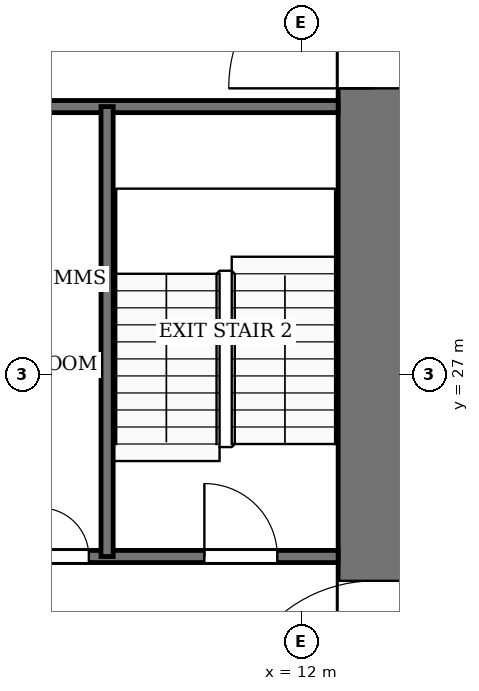
"""IFC4 building model, lengths in metres.
Left out: names, types, materials, properties, quantities, classifications, styles, units other than length and angle.
Written with IfcOpenShell. Run it as: python <this file> out.ifc"""

import sys

from ifc_helpers import new_model, si_unit, direction, frame, frame_2d, origin, place, context, subcontext, project, spatial, rectangle, extrude, element, fill, save


model = new_model("IFC4")
c1 = context("Model", 3, precision=1e-05, world=origin(), true_north=direction((0.0, 1.0)))
c2 = subcontext(c1, "Body", "Model", "MODEL_VIEW")
j1 = project(units=[si_unit("LENGTHUNIT", "METRE"), si_unit("PLANEANGLEUNIT", "RADIAN")], contexts=[c1])
p1 = place(None, origin())
s1 = spatial("IfcSite", under=j1, at=p1, CompositionType="ELEMENT")
p2 = place(p1, origin())
s2 = spatial("IfcBuilding", under=s1, at=p2, CompositionType="ELEMENT")
p3 = place(p2, frame((0.0, 0.0, 70.0)))
s3 = spatial("IfcBuildingStorey", under=s2, at=p3, CompositionType="ELEMENT", Elevation=70.0)
p4 = place(p3, frame((13.2, 18.4, -0.13), z_axis=(0.0, 0.0, 1.0), x_axis=(0.0, 1.0, 0.0)))
e1 = element("IfcWall", 1, at=p4, inside=s3, PredefinedType="SHEAR", context=c2, shape_type="SweptSolid", body=[
    extrude(rectangle(XDim=19.2, YDim=1.2, at=frame_2d((9.6, 0.0))), origin(), (0.0, 0.0, 1.0), 4.0),
])
p5 = place(p4, frame((2.8, 0.0, 0.13)))
e2 = element("IfcOpeningElement", 2, at=p5, cuts=e1, PredefinedType="OPENING", context=c2, shape_type="SweptSolid", body=[
    extrude(rectangle(XDim=2.4, YDim=2.4, at=frame_2d((1.2, 1.2))), frame((0.0, 0.61, 0.0), z_axis=(0.0, -1.0, 0.0), x_axis=(1.0, 0.0, 0.0)), (0.0, 0.0, 1.0), 1.22),
])
p6 = place(p4, frame((13.3, 0.0, 0.13)))
e3 = element("IfcOpeningElement", 3, at=p6, cuts=e1, PredefinedType="OPENING", context=c2, shape_type="SweptSolid", body=[
    extrude(rectangle(XDim=2.4, YDim=2.4, at=frame_2d((1.2, 1.2))), frame((0.0, 0.61, 0.0), z_axis=(0.0, -1.0, 0.0), x_axis=(1.0, 0.0, 0.0)), (0.0, 0.0, 1.0), 1.22),
])
p7 = place(p3, frame((6.0, 24.0, 0.0), z_axis=(0.0, 0.0, 1.0), x_axis=(1.0, 0.0, 0.0)))
e4 = element("IfcWall", 4, at=p7, inside=s3, PredefinedType="PARTITIONING", context=c2, shape_type="SweptSolid", body=[
    extrude(rectangle(XDim=6.6, YDim=0.2, at=frame_2d((3.3, 0.0))), origin(), (0.0, 0.0, 1.0), 3.87),
])
p8 = place(p7, frame((0.3, 0.0, 0.0)))
e5 = element("IfcOpeningElement", 5, at=p8, cuts=e4, PredefinedType="OPENING", context=c2, shape_type="SweptSolid", body=[
    extrude(rectangle(XDim=0.8, YDim=2.1, at=frame_2d((0.4, 1.05))), frame((0.0, 0.11, 0.0), z_axis=(0.0, -1.0, 0.0), x_axis=(1.0, 0.0, 0.0)), (0.0, 0.0, 1.0), 0.22),
])
p9 = place(p7, frame((1.7, 0.0, 0.0)))
e6 = element("IfcOpeningElement", 6, at=p9, cuts=e4, PredefinedType="OPENING", context=c2, shape_type="SweptSolid", body=[
    extrude(rectangle(XDim=0.8, YDim=2.1, at=frame_2d((0.4, 1.05))), frame((0.0, 0.11, 0.0), z_axis=(0.0, -1.0, 0.0), x_axis=(1.0, 0.0, 0.0)), (0.0, 0.0, 1.0), 0.22),
])
p10 = place(p7, frame((4.4, 0.0, 0.0)))
e7 = element("IfcOpeningElement", 7, at=p10, cuts=e4, PredefinedType="OPENING", context=c2, shape_type="SweptSolid", body=[
    extrude(rectangle(XDim=1.2, YDim=2.2, at=frame_2d((0.6, 1.1))), frame((0.0, 0.11, 0.0), z_axis=(0.0, -1.0, 0.0), x_axis=(1.0, 0.0, 0.0)), (0.0, 0.0, 1.0), 0.22),
])
p11 = place(p3, frame((6.0, 31.4, 0.0), z_axis=(0.0, 0.0, 1.0), x_axis=(1.0, 0.0, 0.0)))
e8 = element("IfcWall", 8, at=p11, inside=s3, PredefinedType="PARTITIONING", context=c2, shape_type="SweptSolid", body=[
    extrude(rectangle(XDim=6.6, YDim=0.2, at=frame_2d((3.3, 0.0))), origin(), (0.0, 0.0, 1.0), 3.87),
])
p12 = place(p3, frame((8.8, 24.0, 0.0), z_axis=(0.0, 0.0, 1.0), x_axis=(0.0, 1.0, 0.0)))
e9 = element("IfcWall", 9, at=p12, inside=s3, PredefinedType="PARTITIONING", context=c2, shape_type="SweptSolid", body=[
    extrude(rectangle(XDim=7.4, YDim=0.2, at=frame_2d((3.7, 0.0))), origin(), (0.0, 0.0, 1.0), 3.87),
])
p13 = place(p9, origin())
e10 = element("IfcDoor", 10, at=p13, inside=s3, OperationType="SINGLE_SWING_LEFT", PredefinedType="DOOR", context=c2, shape_type="SweptSolid", body=[
    extrude(rectangle(XDim=0.8, YDim=2.1, at=frame_2d((0.4, 1.05))), frame((0.0, 0.025, 0.0), z_axis=(0.0, -1.0, 0.0), x_axis=(1.0, 0.0, 0.0)), (0.0, 0.0, 1.0), 0.05),
])
fill(e6, e10)
p14 = place(p10, origin())
e11 = element("IfcDoor", 11, at=p14, inside=s3, OperationType="SINGLE_SWING_RIGHT", PredefinedType="DOOR", context=c2, shape_type="SweptSolid", body=[
    extrude(rectangle(XDim=1.2, YDim=2.2, at=frame_2d((0.6, 1.1))), frame((0.0, 0.025, 0.0), z_axis=(0.0, -1.0, 0.0), x_axis=(1.0, 0.0, 0.0)), (0.0, 0.0, 1.0), 0.05),
])
fill(e7, e11)
p15 = place(p5, origin())
e12 = element("IfcDoor", 12, at=p15, inside=s3, OperationType="DOUBLE_DOOR_SINGLE_SWING", PredefinedType="DOOR", context=c2, shape_type="SweptSolid", body=[
    extrude(rectangle(XDim=2.4, YDim=2.4, at=frame_2d((1.2, 1.2))), frame((0.0, 0.025, 0.0), z_axis=(0.0, -1.0, 0.0), x_axis=(1.0, 0.0, 0.0)), (0.0, 0.0, 1.0), 0.05),
])
fill(e2, e12)
p16 = place(p6, origin())
e13 = element("IfcDoor", 13, at=p16, inside=s3, OperationType="DOUBLE_DOOR_SINGLE_SWING", PredefinedType="DOOR", context=c2, shape_type="SweptSolid", body=[
    extrude(rectangle(XDim=2.4, YDim=2.4, at=frame_2d((1.2, 1.2))), frame((0.0, 0.025, 0.0), z_axis=(0.0, -1.0, 0.0), x_axis=(1.0, 0.0, 0.0)), (0.0, 0.0, 1.0), 0.05),
])
fill(e3, e13)
save(model, sys.argv[1])
